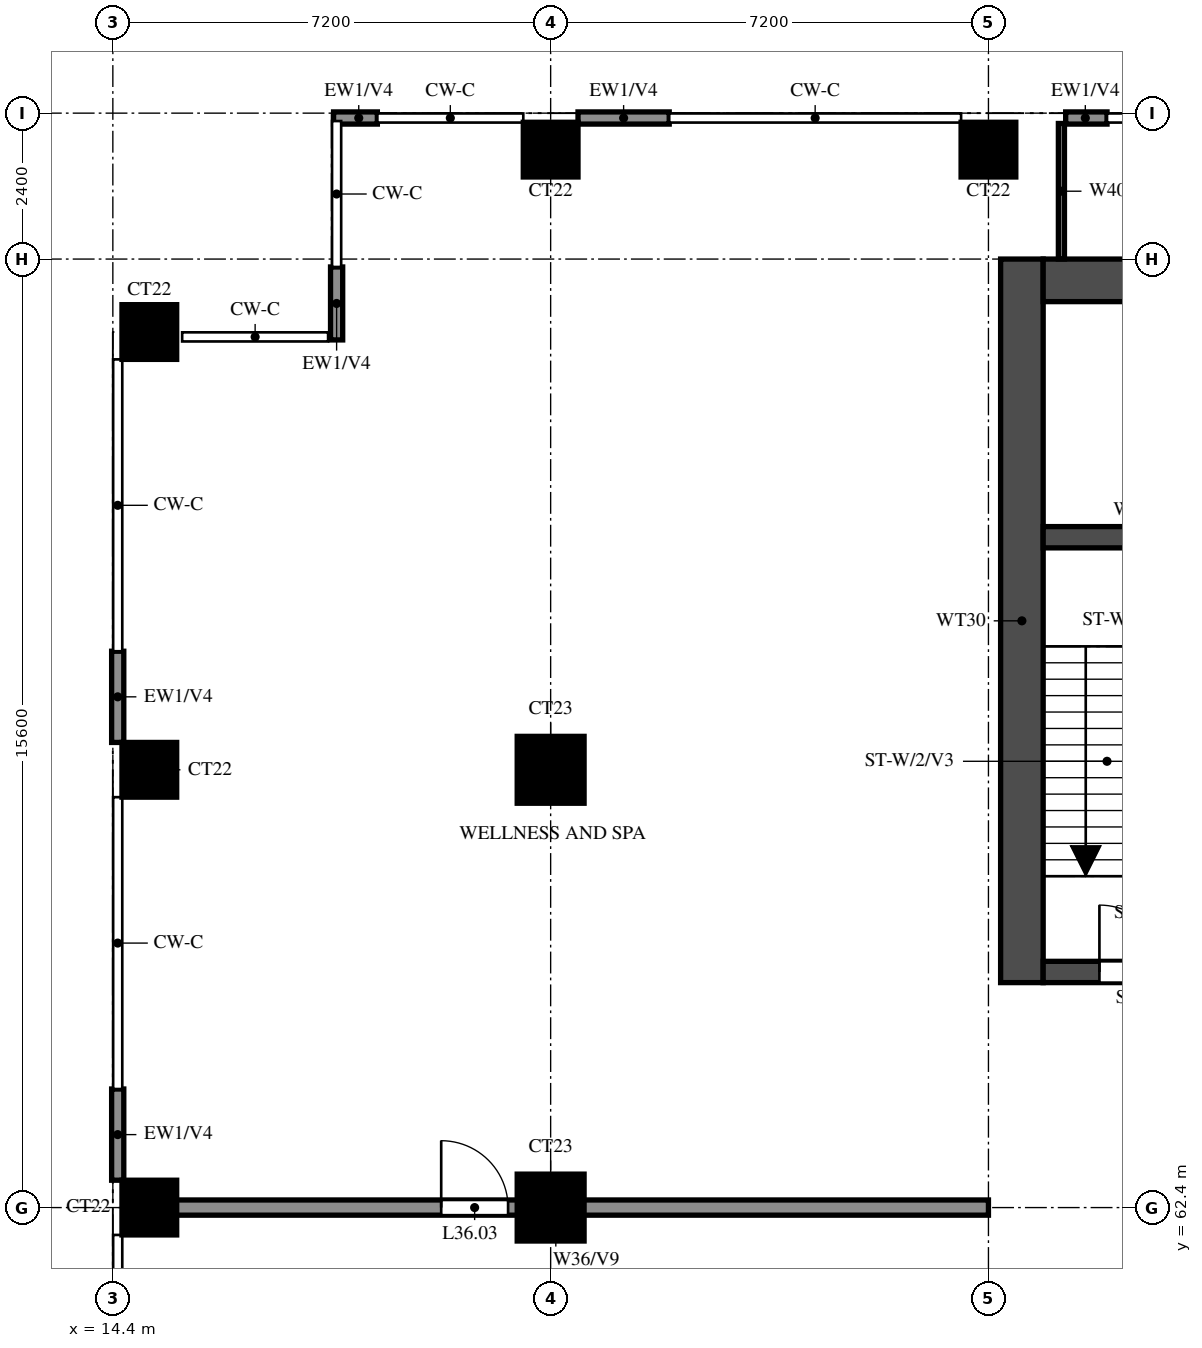
"""IFC4 building model, lengths in metres.
Left out: names, types, materials, properties, quantities, classifications, styles, units other than length and angle.
Written with IfcOpenShell. Run it as: python <this file> out.ifc"""

import sys

from ifc_helpers import new_model, si_unit, direction, frame, frame_2d, origin, origin_2d, place, context, subcontext, project, spatial, rectangle, extrude, source, transform, mapped, element, fill, save


model = new_model("IFC4")
c1 = context("Model", 3, precision=1e-05, world=origin(), true_north=direction((0.0, 1.0)))
c2 = subcontext(c1, "Body", "Model", "MODEL_VIEW")
j1 = project(units=[si_unit("LENGTHUNIT", "METRE"), si_unit("PLANEANGLEUNIT", "RADIAN")], contexts=[c1])
p1 = place(None, origin())
s1 = spatial("IfcSite", under=j1, at=p1, CompositionType="ELEMENT")
p2 = place(p1, origin())
s2 = spatial("IfcBuilding", under=s1, at=p2, CompositionType="ELEMENT")
p3 = place(p2, frame((0.0, 0.0, 137.5)))
s3 = spatial("IfcBuildingStorey", under=s2, at=p3, CompositionType="ELEMENT", Elevation=137.5)
m1 = source(origin(), c2, "Body", "SweptSolid", [
    extrude(rectangle(XDim=0.9, YDim=0.9, at=origin_2d()), origin(), (0.0, 0.0, 1.0), 5.2),
])
p4 = place(p3, frame((15.0, 62.4, 0.0), z_axis=(0.0, 0.0, 1.0), x_axis=(1.0, 0.0, 0.0)))
e1 = element("IfcColumn", 1, at=p4, inside=s3, PredefinedType="COLUMN", context=c2, shape_type="MappedRepresentation", body=[
    mapped(m1, transform((0.0, 0.0, 0.0))),
])
m2 = source(origin(), c2, "Body", "SweptSolid", [
    extrude(rectangle(XDim=1.1, YDim=1.1, at=origin_2d()), origin(), (0.0, 0.0, 1.0), 5.2),
])
p5 = place(p3, frame((21.6, 62.4, 0.0), z_axis=(0.0, 0.0, 1.0), x_axis=(1.0, 0.0, 0.0)))
e2 = element("IfcColumn", 2, at=p5, inside=s3, PredefinedType="COLUMN", context=c2, shape_type="MappedRepresentation", body=[
    mapped(m2, transform((0.0, 0.0, 0.0))),
])
p6 = place(p3, frame((15.0, 69.6, 0.0), z_axis=(0.0, 0.0, 1.0), x_axis=(1.0, 0.0, 0.0)))
e3 = element("IfcColumn", 3, at=p6, inside=s3, PredefinedType="COLUMN", context=c2, shape_type="MappedRepresentation", body=[
    mapped(m1, transform((0.0, 0.0, 0.0))),
])
p7 = place(p3, frame((21.6, 69.6, 0.0), z_axis=(0.0, 0.0, 1.0), x_axis=(1.0, 0.0, 0.0)))
e4 = element("IfcColumn", 4, at=p7, inside=s3, PredefinedType="COLUMN", context=c2, shape_type="MappedRepresentation", body=[
    mapped(m2, transform((0.0, 0.0, 0.0))),
])
for number, where, z_axis, x_axis in (
    (5, (15.0, 76.8, 0.0), (0.0, 0.0, 1.0), (1.0, 0.0, 0.0)),
    (6, (21.6, 79.8, 0.0), (0.0, 0.0, 1.0), (1.0, 0.0, 0.0)),
    (7, (28.8, 79.8, 0.0), (0.0, 0.0, 1.0), (1.0, 0.0, 0.0)),
):
    element("IfcColumn", number, at=place(p3, frame(where, z_axis=z_axis, x_axis=x_axis)), inside=s3, PredefinedType="COLUMN", context=c2, shape_type="MappedRepresentation", body=[
        mapped(m1, transform((0.0, 0.0, 0.0))),
    ])
p8 = place(p3, frame((29.35, 66.1, 0.0), z_axis=(0.0, 0.0, 1.0), x_axis=(0.0, 1.0, 0.0)))
e8 = element("IfcWall", 8, at=p8, inside=s3, PredefinedType="SHEAR", context=c2, shape_type="SweptSolid", body=[
    extrude(rectangle(XDim=11.9, YDim=0.7, at=frame_2d((5.95, 0.0))), origin(), (0.0, 0.0, 1.0), 5.2),
])
p9 = place(p3, frame((29.7, 77.65, 0.0), z_axis=(0.0, 0.0, 1.0), x_axis=(1.0, 0.0, 0.0)))
e9 = element("IfcWall", 9, at=p9, inside=s3, PredefinedType="SHEAR", context=c2, shape_type="SweptSolid", body=[
    extrude(rectangle(XDim=41.4, YDim=0.7, at=frame_2d((20.7, 0.0))), origin(), (0.0, 0.0, 1.0), 5.2),
])
p10 = place(p3, frame((29.7, 66.275, 0.0), z_axis=(0.0, 0.0, 1.0), x_axis=(1.0, 0.0, 0.0)))
e10 = element("IfcWall", 10, at=p10, inside=s3, PredefinedType="SHEAR", context=c2, shape_type="SweptSolid", body=[
    extrude(rectangle(XDim=41.4, YDim=0.35, at=frame_2d((20.7, 0.0))), origin(), (0.0, 0.0, 1.0), 5.2),
])
p11 = place(p10, frame((0.925, 0.0, 0.0)))
e11 = element("IfcOpeningElement", 11, at=p11, cuts=e10, PredefinedType="OPENING", context=c2, shape_type="SweptSolid", body=[
    extrude(rectangle(XDim=1.1, YDim=2.1, at=frame_2d((0.55, 1.05))), frame((0.0, 0.185, 0.0), z_axis=(0.0, -1.0, 0.0), x_axis=(1.0, 0.0, 0.0)), (0.0, 0.0, 1.0), 0.37),
])
p12 = place(p10, frame((3.712, 0.0, 0.0)))
e12 = element("IfcOpeningElement", 12, at=p12, cuts=e10, PredefinedType="OPENING", context=c2, shape_type="SweptSolid", body=[
    extrude(rectangle(XDim=1.8, YDim=2.1, at=frame_2d((0.9, 1.05))), frame((0.0, 0.185, 0.0), z_axis=(0.0, -1.0, 0.0), x_axis=(1.0, 0.0, 0.0)), (0.0, 0.0, 1.0), 0.37),
])
p13 = place(p3, frame((29.7, 73.425, 0.0), z_axis=(0.0, 0.0, 1.0), x_axis=(1.0, 0.0, 0.0)))
e13 = element("IfcWall", 13, at=p13, inside=s3, PredefinedType="SHEAR", context=c2, shape_type="SweptSolid", body=[
    extrude(rectangle(XDim=3.125, YDim=0.35, at=frame_2d((1.562, 0.0))), origin(), (0.0, 0.0, 1.0), 5.2),
])
p14 = place(p3, frame((30.75, 80.32, 0.0), z_axis=(0.0, 0.0, 1.0), x_axis=(-1.0, 0.0, 0.0)))
e14 = element("IfcWall", 14, at=p14, inside=s3, PredefinedType="SOLIDWALL", context=c2, shape_type="SweptSolid", body=[
    extrude(rectangle(XDim=0.68, YDim=0.2, at=frame_2d((0.34, 0.0))), origin(), (0.0, 0.0, 1.0), 5.2),
])
p15 = place(p3, frame((23.55, 80.32, 0.0), z_axis=(0.0, 0.0, 1.0), x_axis=(-1.0, 0.0, 0.0)))
e15 = element("IfcWall", 15, at=p15, inside=s3, PredefinedType="SOLIDWALL", context=c2, shape_type="SweptSolid", body=[
    extrude(rectangle(XDim=1.5, YDim=0.2, at=frame_2d((0.75, 0.0))), origin(), (0.0, 0.0, 1.0), 5.2),
])
p16 = place(p3, frame((18.75, 80.32, 0.0), z_axis=(0.0, 0.0, 1.0), x_axis=(-1.0, 0.0, 0.0)))
e16 = element("IfcWall", 16, at=p16, inside=s3, PredefinedType="SOLIDWALL", context=c2, shape_type="SweptSolid", body=[
    extrude(rectangle(XDim=0.72, YDim=0.2, at=frame_2d((0.36, 0.0))), origin(), (0.0, 0.0, 1.0), 5.2),
])
p17 = place(p3, frame((18.08, 77.87, 0.0), z_axis=(0.0, 0.0, 1.0), x_axis=(0.0, -1.0, 0.0)))
e17 = element("IfcWall", 17, at=p17, inside=s3, PredefinedType="SOLIDWALL", context=c2, shape_type="SweptSolid", body=[
    extrude(rectangle(XDim=1.2, YDim=0.2, at=frame_2d((0.6, 0.0))), origin(), (0.0, 0.0, 1.0), 5.2),
])
for number, where, z_axis, x_axis in (
    (18, (14.48, 71.55, 0.0), (0.0, 0.0, 1.0), (0.0, -1.0, 0.0)),
    (19, (14.48, 64.35, 0.0), (0.0, 0.0, 1.0), (0.0, -1.0, 0.0)),
):
    element("IfcWall", number, at=place(p3, frame(where, z_axis=z_axis, x_axis=x_axis)), inside=s3, PredefinedType="SOLIDWALL", context=c2, shape_type="SweptSolid", body=[
        extrude(rectangle(XDim=1.5, YDim=0.2, at=frame_2d((0.75, 0.0))), origin(), (0.0, 0.0, 1.0), 5.2),
    ])
p18 = place(p3, frame((14.57, 62.4, 0.0), z_axis=(0.0, 0.0, 1.0), x_axis=(1.0, 0.0, 0.0)))
e20 = element("IfcWall", 20, at=p18, inside=s3, PredefinedType="SOLIDWALL", context=c2, shape_type="SweptSolid", body=[
    extrude(rectangle(XDim=14.23, YDim=0.25, at=frame_2d((7.115, 0.0))), origin(), (0.0, 0.0, 1.0), 5.2),
])
p19 = place(p18, frame((5.23, 0.0, 0.0)))
e21 = element("IfcOpeningElement", 21, at=p19, cuts=e20, PredefinedType="OPENING", context=c2, shape_type="SweptSolid", body=[
    extrude(rectangle(XDim=1.1, YDim=2.1, at=frame_2d((0.55, 1.05))), frame((0.0, 0.135, 0.0), z_axis=(0.0, -1.0, 0.0), x_axis=(1.0, 0.0, 0.0)), (0.0, 0.0, 1.0), 0.27),
])
p20 = place(p3, frame((30.0, 78.002, 0.0), z_axis=(0.0, 0.0, 1.0), x_axis=(0.0, 1.0, 0.0)))
e22 = element("IfcWall", 22, at=p20, inside=s3, PredefinedType="PARTITIONING", context=c2, shape_type="SweptSolid", body=[
    extrude(rectangle(XDim=2.228, YDim=0.1, at=frame_2d((1.114, 0.0))), origin(), (0.0, 0.0, 1.0), 4.3),
])
p21 = place(p11, origin())
e23 = element("IfcDoor", 23, at=p21, inside=s3, OperationType="SINGLE_SWING_LEFT", PredefinedType="DOOR", context=c2, shape_type="SweptSolid", body=[
    extrude(rectangle(XDim=1.1, YDim=2.1, at=frame_2d((0.55, 1.05))), frame((0.0, 0.025, 0.0), z_axis=(0.0, -1.0, 0.0), x_axis=(1.0, 0.0, 0.0)), (0.0, 0.0, 1.0), 0.05),
])
fill(e11, e23)
p22 = place(p19, origin())
e24 = element("IfcDoor", 24, at=p22, inside=s3, OperationType="SINGLE_SWING_LEFT", PredefinedType="DOOR", context=c2, shape_type="SweptSolid", body=[
    extrude(rectangle(XDim=1.1, YDim=2.1, at=frame_2d((0.55, 1.05))), frame((0.0, 0.025, 0.0), z_axis=(0.0, -1.0, 0.0), x_axis=(1.0, 0.0, 0.0)), (0.0, 0.0, 1.0), 0.05),
])
fill(e21, e24)
save(model, sys.argv[1])
